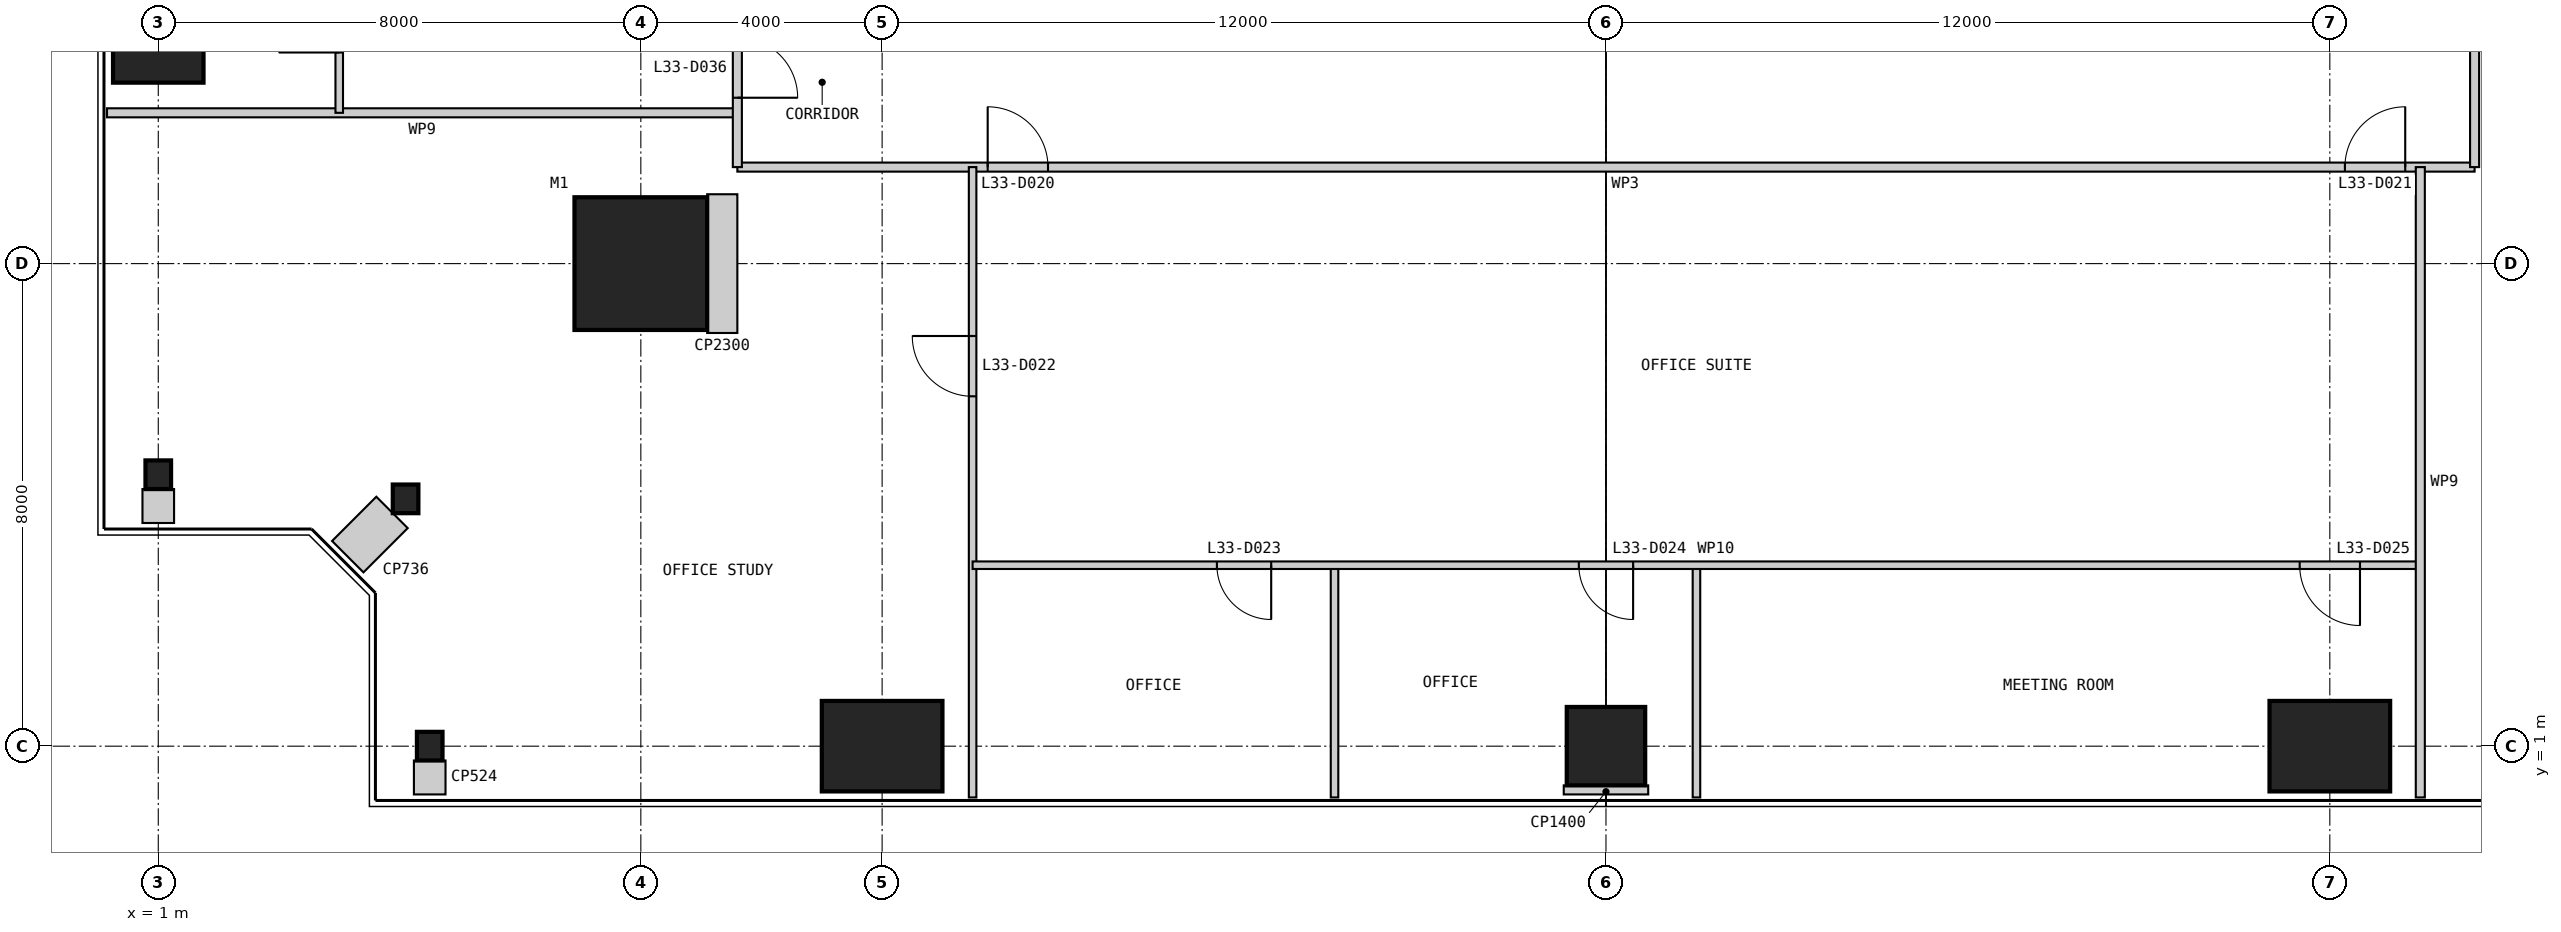
"""IFC4 building model, lengths in metres.
Left out: names, types, materials, properties, quantities, classifications, styles, units other than length and angle.
Written with IfcOpenShell. Run it as: python <this file> out.ifc"""

import sys

from ifc_helpers import new_model, si_unit, direction, frame, frame_2d, origin, origin_2d, place, context, subcontext, project, spatial, rectangle, i_section, extrude, element, fill, save


model = new_model("IFC4")
c1 = context("Model", 3, precision=1e-05, world=origin(), true_north=direction((0.0, 1.0)))
c2 = subcontext(c1, "Body", "Model", "MODEL_VIEW")
j1 = project(units=[si_unit("LENGTHUNIT", "METRE"), si_unit("PLANEANGLEUNIT", "RADIAN")], contexts=[c1])
p1 = place(None, origin())
s1 = spatial("IfcSite", under=j1, at=p1, CompositionType="ELEMENT")
p2 = place(p1, origin())
s2 = spatial("IfcBuilding", under=s1, at=p2, CompositionType="ELEMENT")
p3 = place(p2, frame((0.0, 0.0, 142.4)))
s3 = spatial("IfcBuildingStorey", under=s2, at=p3, CompositionType="ELEMENT", Elevation=142.4)
p4 = place(p3, frame((9.0, 9.0, 0.0), z_axis=(0.0, 0.0, 1.0), x_axis=(1.0, 0.0, 0.0)))
e1 = element("IfcColumn", 1, at=p4, inside=s3, PredefinedType="COLUMN", context=c2, shape_type="SweptSolid", body=[
    extrude(rectangle(XDim=2.2, YDim=2.2, at=origin_2d()), origin(), (0.0, 0.0, 1.0), 4.0),
])
p5 = place(p3, frame((5.5, 1.0, 0.0), z_axis=(0.0, 0.0, 1.0), x_axis=(1.0, 0.0, 0.0)))
e2 = element("IfcColumn", 2, at=p5, inside=s3, PredefinedType="COLUMN", context=c2, shape_type="SweptSolid", body=[
    extrude(i_section(OverallWidth=0.424, OverallDepth=0.475, WebThickness=0.048, FlangeThickness=0.077, at=origin_2d()), origin(), (0.0, 0.0, 1.0), 4.0),
])
p6 = place(p3, frame((13.0, 1.0, 0.0), z_axis=(0.0, 0.0, 1.0), x_axis=(1.0, 0.0, 0.0)))
e3 = element("IfcColumn", 3, at=p6, inside=s3, PredefinedType="COLUMN", context=c2, shape_type="SweptSolid", body=[
    extrude(rectangle(XDim=2.0, YDim=1.5, at=origin_2d()), origin(), (0.0, 0.0, 1.0), 4.0),
])
p7 = place(p3, frame((25.0, 1.0, 0.0), z_axis=(0.0, 0.0, 1.0), x_axis=(1.0, 0.0, 0.0)))
e4 = element("IfcColumn", 4, at=p7, inside=s3, PredefinedType="COLUMN", context=c2, shape_type="SweptSolid", body=[
    extrude(rectangle(XDim=1.3, YDim=1.3, at=origin_2d()), origin(), (0.0, 0.0, 1.0), 4.0),
])
p8 = place(p3, frame((37.0, 1.0, 0.0), z_axis=(0.0, 0.0, 1.0), x_axis=(1.0, 0.0, 0.0)))
e5 = element("IfcColumn", 5, at=p8, inside=s3, PredefinedType="COLUMN", context=c2, shape_type="SweptSolid", body=[
    extrude(rectangle(XDim=2.0, YDim=1.5, at=origin_2d()), origin(), (0.0, 0.0, 1.0), 4.0),
])
p9 = place(p3, frame((1.0, 13.0, 0.0), z_axis=(0.0, 0.0, 1.0), x_axis=(1.0, 0.0, 0.0)))
e6 = element("IfcColumn", 6, at=p9, inside=s3, PredefinedType="COLUMN", context=c2, shape_type="SweptSolid", body=[
    extrude(rectangle(XDim=1.5, YDim=2.0, at=origin_2d()), origin(), (0.0, 0.0, 1.0), 4.0),
])
for number, where, z_axis, x_axis in (
    (7, (1.0, 5.5, 0.0), (0.0, 0.0, 1.0), (1.0, 0.0, 0.0)),
    (8, (5.1, 5.1, 0.0), (0.0, 0.0, 1.0), (1.0, 0.0, 0.0)),
):
    element("IfcColumn", number, at=place(p3, frame(where, z_axis=z_axis, x_axis=x_axis)), inside=s3, PredefinedType="COLUMN", context=c2, shape_type="SweptSolid", body=[
        extrude(i_section(OverallWidth=0.424, OverallDepth=0.475, WebThickness=0.048, FlangeThickness=0.077, at=origin_2d()), origin(), (0.0, 0.0, 1.0), 4.0),
    ])
p10 = place(p3, frame((10.6, 10.6, 0.0), z_axis=(0.0, 0.0, 1.0), x_axis=(1.0, 0.0, 0.0)))
e9 = element("IfcWall", 9, at=p10, inside=s3, PredefinedType="PARTITIONING", context=c2, shape_type="SweptSolid", body=[
    extrude(rectangle(XDim=28.8, YDim=0.15, at=frame_2d((14.4, 0.0))), origin(), (0.0, 0.0, 1.0), 3.85),
])
p11 = place(p10, frame((4.15, 0.0, 0.0)))
e10 = element("IfcOpeningElement", 10, at=p11, cuts=e9, PredefinedType="OPENING", context=c2, shape_type="SweptSolid", body=[
    extrude(rectangle(XDim=1.0, YDim=2.2, at=frame_2d((0.5, 1.1))), frame((0.0, 0.085, 0.0), z_axis=(0.0, -1.0, 0.0), x_axis=(1.0, 0.0, 0.0)), (0.0, 0.0, 1.0), 0.17),
])
p12 = place(p10, frame((26.65, 0.0, 0.0)))
e11 = element("IfcOpeningElement", 11, at=p12, cuts=e9, PredefinedType="OPENING", context=c2, shape_type="SweptSolid", body=[
    extrude(rectangle(XDim=1.0, YDim=2.2, at=frame_2d((0.5, 1.1))), frame((0.0, 0.085, 0.0), z_axis=(0.0, -1.0, 0.0), x_axis=(1.0, 0.0, 0.0)), (0.0, 0.0, 1.0), 0.17),
])
p13 = place(p3, frame((0.15, 11.5, 0.0), z_axis=(0.0, 0.0, 1.0), x_axis=(1.0, 0.0, 0.0)))
e12 = element("IfcWall", 12, at=p13, inside=s3, PredefinedType="PARTITIONING", context=c2, shape_type="SweptSolid", body=[
    extrude(rectangle(XDim=10.45, YDim=0.15, at=frame_2d((5.225, 0.0))), origin(), (0.0, 0.0, 1.0), 3.85),
])
p14 = place(p3, frame((14.5, 0.15, 0.0), z_axis=(0.0, 0.0, 1.0), x_axis=(0.0, 1.0, 0.0)))
e13 = element("IfcWall", 13, at=p14, inside=s3, PredefinedType="PARTITIONING", context=c2, shape_type="SweptSolid", body=[
    extrude(rectangle(XDim=10.45, YDim=0.125, at=frame_2d((5.225, 0.0))), origin(), (0.0, 0.0, 1.0), 3.85),
])
p15 = place(p14, frame((6.65, 0.0, 0.0)))
e14 = element("IfcOpeningElement", 14, at=p15, cuts=e13, PredefinedType="OPENING", context=c2, shape_type="SweptSolid", body=[
    extrude(rectangle(XDim=1.0, YDim=2.2, at=frame_2d((0.5, 1.1))), frame((0.0, 0.073, 0.0), z_axis=(0.0, -1.0, 0.0), x_axis=(1.0, 0.0, 0.0)), (0.0, 0.0, 1.0), 0.145),
])
for number, where, z_axis, x_axis in (
    (15, (20.5, 0.15, 0.0), (0.0, 0.0, 1.0), (0.0, 1.0, 0.0)),
    (16, (26.5, 0.15, 0.0), (0.0, 0.0, 1.0), (0.0, 1.0, 0.0)),
):
    element("IfcWall", number, at=place(p3, frame(where, z_axis=z_axis, x_axis=x_axis)), inside=s3, PredefinedType="PARTITIONING", context=c2, shape_type="SweptSolid", body=[
        extrude(rectangle(XDim=3.85, YDim=0.125, at=frame_2d((1.925, 0.0))), origin(), (0.0, 0.0, 1.0), 3.85),
    ])
p16 = place(p3, frame((14.5, 4.0, 0.0), z_axis=(0.0, 0.0, 1.0), x_axis=(1.0, 0.0, 0.0)))
e17 = element("IfcWall", 17, at=p16, inside=s3, PredefinedType="PARTITIONING", context=c2, shape_type="SweptSolid", body=[
    extrude(rectangle(XDim=24.0, YDim=0.125, at=frame_2d((12.0, 0.0))), origin(), (0.0, 0.0, 1.0), 3.85),
])
p17 = place(p16, frame((4.05, 0.0, 0.0)))
e18 = element("IfcOpeningElement", 18, at=p17, cuts=e17, PredefinedType="OPENING", context=c2, shape_type="SweptSolid", body=[
    extrude(rectangle(XDim=0.9, YDim=2.2, at=frame_2d((0.45, 1.1))), frame((0.0, 0.073, 0.0), z_axis=(0.0, -1.0, 0.0), x_axis=(1.0, 0.0, 0.0)), (0.0, 0.0, 1.0), 0.145),
])
p18 = place(p16, frame((10.05, 0.0, 0.0)))
e19 = element("IfcOpeningElement", 19, at=p18, cuts=e17, PredefinedType="OPENING", context=c2, shape_type="SweptSolid", body=[
    extrude(rectangle(XDim=0.9, YDim=2.2, at=frame_2d((0.45, 1.1))), frame((0.0, 0.073, 0.0), z_axis=(0.0, -1.0, 0.0), x_axis=(1.0, 0.0, 0.0)), (0.0, 0.0, 1.0), 0.145),
])
p19 = place(p16, frame((22.0, 0.0, 0.0)))
e20 = element("IfcOpeningElement", 20, at=p19, cuts=e17, PredefinedType="OPENING", context=c2, shape_type="SweptSolid", body=[
    extrude(rectangle(XDim=1.0, YDim=2.2, at=frame_2d((0.5, 1.1))), frame((0.0, 0.073, 0.0), z_axis=(0.0, -1.0, 0.0), x_axis=(1.0, 0.0, 0.0)), (0.0, 0.0, 1.0), 0.145),
])
p20 = place(p3, frame((39.4, 10.6, 0.0), z_axis=(0.0, 0.0, 1.0), x_axis=(0.0, 1.0, 0.0)))
e21 = element("IfcWall", 21, at=p20, inside=s3, PredefinedType="PARTITIONING", context=c2, shape_type="SweptSolid", body=[
    extrude(rectangle(XDim=27.9, YDim=0.15, at=frame_2d((13.95, 0.0))), origin(), (0.0, 0.0, 1.0), 3.85),
])
p21 = place(p20, frame((4.15, 0.0, 0.0)))
e22 = element("IfcOpeningElement", 22, at=p21, cuts=e21, PredefinedType="OPENING", context=c2, shape_type="SweptSolid", body=[
    extrude(rectangle(XDim=1.0, YDim=2.2, at=frame_2d((0.5, 1.1))), frame((0.0, 0.085, 0.0), z_axis=(0.0, -1.0, 0.0), x_axis=(1.0, 0.0, 0.0)), (0.0, 0.0, 1.0), 0.17),
])
p22 = place(p20, frame((23.65, 0.0, 0.0)))
e23 = element("IfcOpeningElement", 23, at=p22, cuts=e21, PredefinedType="OPENING", context=c2, shape_type="SweptSolid", body=[
    extrude(rectangle(XDim=1.0, YDim=2.2, at=frame_2d((0.5, 1.1))), frame((0.0, 0.085, 0.0), z_axis=(0.0, -1.0, 0.0), x_axis=(1.0, 0.0, 0.0)), (0.0, 0.0, 1.0), 0.17),
])
p23 = place(p3, frame((38.5, 0.15, 0.0), z_axis=(0.0, 0.0, 1.0), x_axis=(0.0, 1.0, 0.0)))
e24 = element("IfcWall", 24, at=p23, inside=s3, PredefinedType="PARTITIONING", context=c2, shape_type="SweptSolid", body=[
    extrude(rectangle(XDim=10.45, YDim=0.15, at=frame_2d((5.225, 0.0))), origin(), (0.0, 0.0, 1.0), 3.85),
])
p24 = place(p3, frame((10.6, 38.5, 0.0), z_axis=(0.0, 0.0, 1.0), x_axis=(0.0, -1.0, 0.0)))
e25 = element("IfcWall", 25, at=p24, inside=s3, PredefinedType="PARTITIONING", context=c2, shape_type="SweptSolid", body=[
    extrude(rectangle(XDim=27.9, YDim=0.15, at=frame_2d((13.95, 0.0))), origin(), (0.0, 0.0, 1.0), 3.85),
])
p25 = place(p24, frame((3.25, 0.0, 0.0)))
e26 = element("IfcOpeningElement", 26, at=p25, cuts=e25, PredefinedType="OPENING", context=c2, shape_type="SweptSolid", body=[
    extrude(rectangle(XDim=1.0, YDim=2.2, at=frame_2d((0.5, 1.1))), frame((0.0, 0.085, 0.0), z_axis=(0.0, -1.0, 0.0), x_axis=(1.0, 0.0, 0.0)), (0.0, 0.0, 1.0), 0.17),
])
p26 = place(p24, frame((25.75, 0.0, 0.0)))
e27 = element("IfcOpeningElement", 27, at=p26, cuts=e25, PredefinedType="OPENING", context=c2, shape_type="SweptSolid", body=[
    extrude(rectangle(XDim=1.0, YDim=2.2, at=frame_2d((0.5, 1.1))), frame((0.0, 0.085, 0.0), z_axis=(0.0, -1.0, 0.0), x_axis=(1.0, 0.0, 0.0)), (0.0, 0.0, 1.0), 0.17),
])
p27 = place(p3, frame((4.0, 35.5, 0.0), z_axis=(0.0, 0.0, 1.0), x_axis=(0.0, -1.0, 0.0)))
e28 = element("IfcWall", 28, at=p27, inside=s3, PredefinedType="PARTITIONING", context=c2, shape_type="SweptSolid", body=[
    extrude(rectangle(XDim=24.0, YDim=0.125, at=frame_2d((12.0, 0.0))), origin(), (0.0, 0.0, 1.0), 3.238),
])
p28 = place(p27, frame((4.05, 0.0, 0.0)))
e29 = element("IfcOpeningElement", 29, at=p28, cuts=e28, PredefinedType="OPENING", context=c2, shape_type="SweptSolid", body=[
    extrude(rectangle(XDim=0.9, YDim=2.2, at=frame_2d((0.45, 1.1))), frame((0.0, 0.073, 0.0), z_axis=(0.0, -1.0, 0.0), x_axis=(1.0, 0.0, 0.0)), (0.0, 0.0, 1.0), 0.145),
])
p29 = place(p27, frame((10.05, 0.0, 0.0)))
e30 = element("IfcOpeningElement", 30, at=p29, cuts=e28, PredefinedType="OPENING", context=c2, shape_type="SweptSolid", body=[
    extrude(rectangle(XDim=0.9, YDim=2.2, at=frame_2d((0.45, 1.1))), frame((0.0, 0.073, 0.0), z_axis=(0.0, -1.0, 0.0), x_axis=(1.0, 0.0, 0.0)), (0.0, 0.0, 1.0), 0.145),
])
p30 = place(p27, frame((22.0, 0.0, 0.0)))
e31 = element("IfcOpeningElement", 31, at=p30, cuts=e28, PredefinedType="OPENING", context=c2, shape_type="SweptSolid", body=[
    extrude(rectangle(XDim=1.0, YDim=2.2, at=frame_2d((0.5, 1.1))), frame((0.0, 0.073, 0.0), z_axis=(0.0, -1.0, 0.0), x_axis=(1.0, 0.0, 0.0)), (0.0, 0.0, 1.0), 0.145),
])
p31 = place(p3, frame((10.6, 9.0, 0.0), z_axis=(0.0, 0.0, 1.0), x_axis=(-1.0, 0.0, 0.0)))
e32 = element("IfcWall", 32, at=p31, inside=s3, PredefinedType="PARTITIONING", context=c2, shape_type="SweptSolid", body=[
    extrude(rectangle(XDim=0.5, YDim=2.3, at=frame_2d((0.25, 0.0))), origin(), (0.0, 0.0, 1.0), 3.85),
])
for number, where, z_axis, x_axis in (
    (33, (5.5, 0.2, 0.0), (0.0, 0.0, 1.0), (0.0, 1.0, 0.0)),
    (34, (1.0, 4.7, 0.0), (0.0, 0.0, 1.0), (0.0, 1.0, 0.0)),
):
    element("IfcWall", number, at=place(p3, frame(where, z_axis=z_axis, x_axis=x_axis)), inside=s3, PredefinedType="PARTITIONING", context=c2, shape_type="SweptSolid", body=[
        extrude(rectangle(XDim=0.562, YDim=0.524, at=frame_2d((0.281, 0.0))), origin(), (0.0, 0.0, 1.0), 3.85),
    ])
p32 = place(p3, frame((4.141, 4.141, 0.0), z_axis=(0.0, 0.0, 1.0), x_axis=(0.707106781187, 0.707106781187, 0.0)))
e35 = element("IfcWall", 35, at=p32, inside=s3, PredefinedType="PARTITIONING", context=c2, shape_type="SweptSolid", body=[
    extrude(rectangle(XDim=1.038, YDim=0.736, at=frame_2d((0.519, 0.0))), origin(), (0.0, 0.0, 1.0), 3.85),
])
p33 = place(p3, frame((25.0, 0.2, 0.0), z_axis=(0.0, 0.0, 1.0), x_axis=(0.0, 1.0, 0.0)))
e36 = element("IfcWall", 36, at=p33, inside=s3, PredefinedType="PARTITIONING", context=c2, shape_type="SweptSolid", body=[
    extrude(rectangle(XDim=0.15, YDim=1.4, at=frame_2d((0.075, 0.0))), origin(), (0.0, 0.0, 1.0), 3.85),
])
p34 = place(p11, origin())
e37 = element("IfcDoor", 37, at=p34, inside=s3, OperationType="SINGLE_SWING_LEFT", PredefinedType="DOOR", context=c2, shape_type="SweptSolid", body=[
    extrude(rectangle(XDim=1.0, YDim=2.2, at=frame_2d((0.5, 1.1))), frame((0.0, 0.025, 0.0), z_axis=(0.0, -1.0, 0.0), x_axis=(1.0, 0.0, 0.0)), (0.0, 0.0, 1.0), 0.05),
])
fill(e10, e37)
p35 = place(p12, origin())
e38 = element("IfcDoor", 38, at=p35, inside=s3, OperationType="SINGLE_SWING_RIGHT", PredefinedType="DOOR", context=c2, shape_type="SweptSolid", body=[
    extrude(rectangle(XDim=1.0, YDim=2.2, at=frame_2d((0.5, 1.1))), frame((0.0, 0.025, 0.0), z_axis=(0.0, -1.0, 0.0), x_axis=(1.0, 0.0, 0.0)), (0.0, 0.0, 1.0), 0.05),
])
fill(e11, e38)
p36 = place(p15, origin())
e39 = element("IfcDoor", 39, at=p36, inside=s3, OperationType="SINGLE_SWING_RIGHT", PredefinedType="DOOR", context=c2, shape_type="SweptSolid", body=[
    extrude(rectangle(XDim=1.0, YDim=2.2, at=frame_2d((0.5, 1.1))), frame((0.0, 0.025, 0.0), z_axis=(0.0, -1.0, 0.0), x_axis=(1.0, 0.0, 0.0)), (0.0, 0.0, 1.0), 0.05),
])
fill(e14, e39)
p37 = place(p17, frame((0.9, 0.0, 0.0), z_axis=(0.0, 0.0, 1.0), x_axis=(-1.0, 0.0, 0.0)))
e40 = element("IfcDoor", 40, at=p37, inside=s3, OperationType="SINGLE_SWING_LEFT", PredefinedType="DOOR", context=c2, shape_type="SweptSolid", body=[
    extrude(rectangle(XDim=0.9, YDim=2.2, at=frame_2d((0.45, 1.1))), frame((0.0, 0.025, 0.0), z_axis=(0.0, -1.0, 0.0), x_axis=(1.0, 0.0, 0.0)), (0.0, 0.0, 1.0), 0.05),
])
fill(e18, e40)
p38 = place(p18, frame((0.9, 0.0, 0.0), z_axis=(0.0, 0.0, 1.0), x_axis=(-1.0, 0.0, 0.0)))
e41 = element("IfcDoor", 41, at=p38, inside=s3, OperationType="SINGLE_SWING_LEFT", PredefinedType="DOOR", context=c2, shape_type="SweptSolid", body=[
    extrude(rectangle(XDim=0.9, YDim=2.2, at=frame_2d((0.45, 1.1))), frame((0.0, 0.025, 0.0), z_axis=(0.0, -1.0, 0.0), x_axis=(1.0, 0.0, 0.0)), (0.0, 0.0, 1.0), 0.05),
])
fill(e19, e41)
p39 = place(p19, frame((1.0, 0.0, 0.0), z_axis=(0.0, 0.0, 1.0), x_axis=(-1.0, 0.0, 0.0)))
e42 = element("IfcDoor", 42, at=p39, inside=s3, OperationType="SINGLE_SWING_LEFT", PredefinedType="DOOR", context=c2, shape_type="SweptSolid", body=[
    extrude(rectangle(XDim=1.0, YDim=2.2, at=frame_2d((0.5, 1.1))), frame((0.0, 0.025, 0.0), z_axis=(0.0, -1.0, 0.0), x_axis=(1.0, 0.0, 0.0)), (0.0, 0.0, 1.0), 0.05),
])
fill(e20, e42)
p40 = place(p26, origin())
e43 = element("IfcDoor", 43, at=p40, inside=s3, OperationType="SINGLE_SWING_RIGHT", PredefinedType="DOOR", context=c2, shape_type="SweptSolid", body=[
    extrude(rectangle(XDim=1.0, YDim=2.2, at=frame_2d((0.5, 1.1))), frame((0.0, 0.025, 0.0), z_axis=(0.0, -1.0, 0.0), x_axis=(1.0, 0.0, 0.0)), (0.0, 0.0, 1.0), 0.05),
])
fill(e27, e43)
save(model, sys.argv[1])
